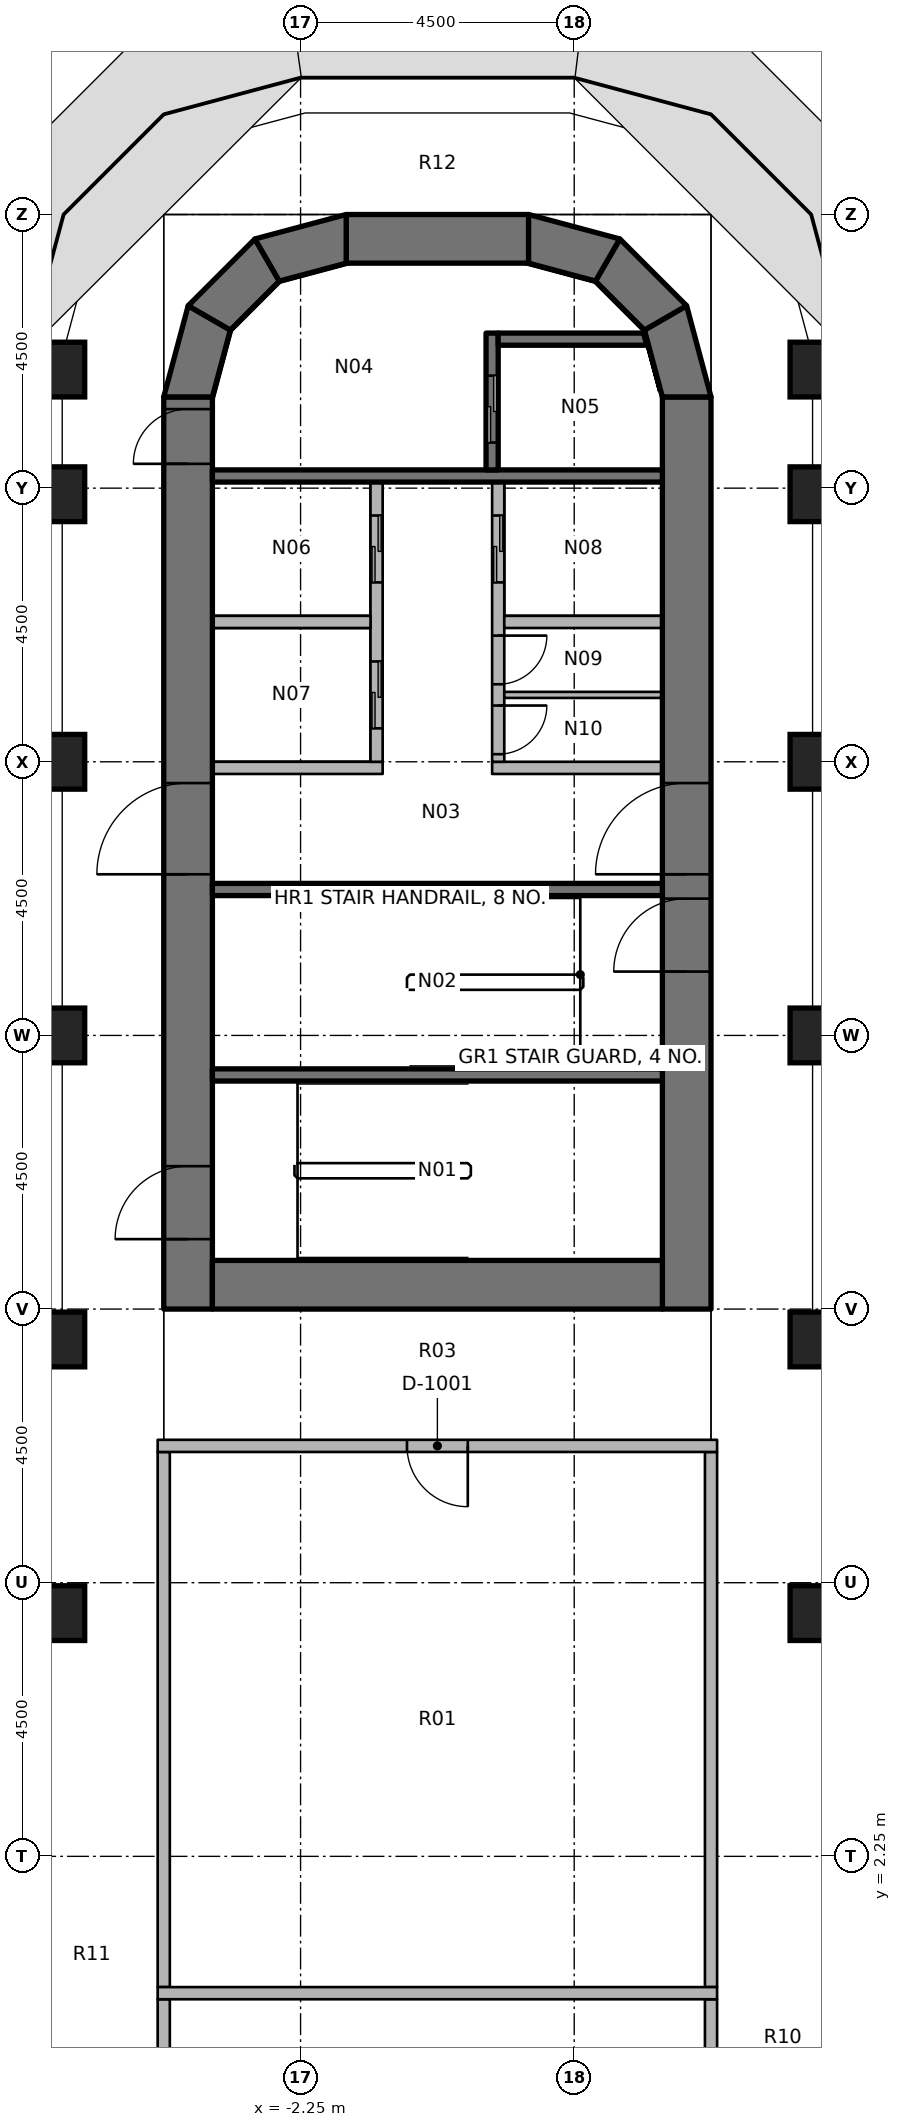
"""IFC4 building model, lengths in metres.
Left out: names, types, materials, properties, quantities, classifications, styles, units other than length and angle.
Written with IfcOpenShell. Run it as: python <this file> out.ifc"""

import sys

from ifc_helpers import new_model, si_unit, direction, frame, frame_2d, origin, origin_2d, place, context, subcontext, project, spatial, polyline, rectangle, outline, extrude, element, fill, save


model = new_model("IFC4")
c1 = context("Model", 3, precision=1e-05, world=origin(), true_north=direction((0.0, 1.0)))
c2 = subcontext(c1, "Body", "Model", "MODEL_VIEW")
j1 = project(units=[si_unit("LENGTHUNIT", "METRE"), si_unit("PLANEANGLEUNIT", "RADIAN")], contexts=[c1])
p1 = place(None, origin())
s1 = spatial("IfcSite", under=j1, at=p1, CompositionType="ELEMENT")
p2 = place(p1, origin())
s2 = spatial("IfcBuilding", under=s1, at=p2, CompositionType="ELEMENT")
p3 = place(p2, frame((0.0, 0.0, 117.0)))
s3 = spatial("IfcBuildingStorey", under=s2, at=p3, CompositionType="ELEMENT", Elevation=117.0)
for number, where, z_axis, x_axis in (
    (1, (-6.25, 6.25, 0.0), (0.0, 0.0, 1.0), (1.0, 0.0, 0.0)),
    (2, (-6.25, 10.75, 0.0), (0.0, 0.0, 1.0), (1.0, 0.0, 0.0)),
    (3, (-6.25, 15.75, 0.0), (0.0, 0.0, 1.0), (1.0, 0.0, 0.0)),
    (4, (-6.25, 20.25, 0.0), (0.0, 0.0, 1.0), (1.0, 0.0, 0.0)),
    (5, (-6.25, 24.65, 0.0), (0.0, 0.0, 1.0), (1.0, 0.0, 0.0)),
    (6, (-6.25, 26.7, 0.0), (0.0, 0.0, 1.0), (1.0, 0.0, 0.0)),
    (7, (6.25, 6.25, 0.0), (0.0, 0.0, 1.0), (1.0, 0.0, 0.0)),
    (8, (6.25, 10.75, 0.0), (0.0, 0.0, 1.0), (1.0, 0.0, 0.0)),
    (9, (6.25, 15.75, 0.0), (0.0, 0.0, 1.0), (1.0, 0.0, 0.0)),
    (10, (6.25, 20.25, 0.0), (0.0, 0.0, 1.0), (1.0, 0.0, 0.0)),
    (11, (6.25, 24.65, 0.0), (0.0, 0.0, 1.0), (1.0, 0.0, 0.0)),
    (12, (6.25, 26.7, 0.0), (0.0, 0.0, 1.0), (1.0, 0.0, 0.0)),
):
    element("IfcColumn", number, at=place(p3, frame(where, z_axis=z_axis, x_axis=x_axis)), inside=s3, PredefinedType="COLUMN", context=c2, shape_type="SweptSolid", body=[
        extrude(rectangle(XDim=0.9, YDim=0.9, at=origin_2d()), origin(), (0.0, 0.0, 1.0), 3.65),
    ])
p4 = place(p3, frame((-4.1, 11.25, 0.0), z_axis=(0.0, 0.0, 1.0), x_axis=(0.0, 1.0, 0.0)))
e13 = element("IfcWall", 13, at=p4, inside=s3, PredefinedType="SHEAR", context=c2, shape_type="SweptSolid", body=[
    extrude(rectangle(XDim=15.0, YDim=0.8, at=frame_2d((7.5, 0.0))), origin(), (0.0, 0.0, 1.0), 3.8),
])
p5 = place(p4, frame((7.15, 0.0, 0.0)))
e14 = element("IfcOpeningElement", 14, at=p5, cuts=e13, PredefinedType="OPENING", context=c2, shape_type="SweptSolid", body=[
    extrude(rectangle(XDim=1.5, YDim=2.3, at=frame_2d((0.75, 1.15))), frame((0.0, 0.41, 0.0), z_axis=(0.0, -1.0, 0.0), x_axis=(1.0, 0.0, 0.0)), (0.0, 0.0, 1.0), 0.82),
])
p6 = place(p4, frame((13.9, 0.0, 0.0)))
e15 = element("IfcOpeningElement", 15, at=p6, cuts=e13, PredefinedType="OPENING", context=c2, shape_type="SweptSolid", body=[
    extrude(rectangle(XDim=0.9, YDim=2.1, at=frame_2d((0.45, 1.05))), frame((0.0, 0.41, 0.0), z_axis=(0.0, -1.0, 0.0), x_axis=(1.0, 0.0, 0.0)), (0.0, 0.0, 1.0), 0.82),
])
p7 = place(p4, frame((1.15, 0.0, 0.0)))
e16 = element("IfcOpeningElement", 16, at=p7, cuts=e13, PredefinedType="OPENING", context=c2, shape_type="SweptSolid", body=[
    extrude(rectangle(XDim=1.2, YDim=2.1, at=frame_2d((0.6, 1.05))), frame((0.0, 0.41, 0.0), z_axis=(0.0, -1.0, 0.0), x_axis=(1.0, 0.0, 0.0)), (0.0, 0.0, 1.0), 0.82),
])
p8 = place(p3, frame((4.1, 11.25, 0.0), z_axis=(0.0, 0.0, 1.0), x_axis=(0.0, 1.0, 0.0)))
e17 = element("IfcWall", 17, at=p8, inside=s3, PredefinedType="SHEAR", context=c2, shape_type="SweptSolid", body=[
    extrude(rectangle(XDim=15.0, YDim=0.8, at=frame_2d((7.5, 0.0))), origin(), (0.0, 0.0, 1.0), 3.8),
])
p9 = place(p8, frame((7.15, 0.0, 0.0)))
e18 = element("IfcOpeningElement", 18, at=p9, cuts=e17, PredefinedType="OPENING", context=c2, shape_type="SweptSolid", body=[
    extrude(rectangle(XDim=1.5, YDim=2.3, at=frame_2d((0.75, 1.15))), frame((0.0, 0.41, 0.0), z_axis=(0.0, -1.0, 0.0), x_axis=(1.0, 0.0, 0.0)), (0.0, 0.0, 1.0), 0.82),
])
p10 = place(p8, frame((5.55, 0.0, 0.0)))
e19 = element("IfcOpeningElement", 19, at=p10, cuts=e17, PredefinedType="OPENING", context=c2, shape_type="SweptSolid", body=[
    extrude(rectangle(XDim=1.2, YDim=2.1, at=frame_2d((0.6, 1.05))), frame((0.0, 0.41, 0.0), z_axis=(0.0, -1.0, 0.0), x_axis=(1.0, 0.0, 0.0)), (0.0, 0.0, 1.0), 0.82),
])
p11 = place(p3, frame((-3.7, 11.65, 0.0), z_axis=(0.0, 0.0, 1.0), x_axis=(1.0, 0.0, 0.0)))
e20 = element("IfcWall", 20, at=p11, inside=s3, PredefinedType="SHEAR", context=c2, shape_type="SweptSolid", body=[
    extrude(rectangle(XDim=7.4, YDim=0.8, at=frame_2d((3.7, 0.0))), origin(), (0.0, 0.0, 1.0), 3.8),
])
p12 = place(p3, frame((-1.5, 28.85, 0.0), z_axis=(0.0, 0.0, 1.0), x_axis=(1.0, 0.0, 0.0)))
e21 = element("IfcWall", 21, at=p12, inside=s3, PredefinedType="SHEAR", context=c2, shape_type="SweptSolid", body=[
    extrude(rectangle(XDim=3.0, YDim=0.8, at=frame_2d((1.5, 0.0))), origin(), (0.0, 0.0, 1.0), 3.8),
])
p13 = place(p3, origin())
e22 = element("IfcWall", 22, at=p13, inside=s3, PredefinedType="SHEAR", context=c2, shape_type="SweptSolid", body=[
    extrude(outline(polyline([(-4.5, 26.25), (-4.098, 27.75), (-3.405, 27.35), (-3.7, 26.25), (-4.5, 26.25)])), origin(), (0.0, 0.0, 1.0), 3.8),
])
p14 = place(p3, origin())
e23 = element("IfcWall", 23, at=p14, inside=s3, PredefinedType="SHEAR", context=c2, shape_type="SweptSolid", body=[
    extrude(outline(polyline([(-4.098, 27.75), (-3.0, 28.848), (-2.6, 28.155), (-3.405, 27.35), (-4.098, 27.75)])), origin(), (0.0, 0.0, 1.0), 3.8),
])
p15 = place(p3, origin())
e24 = element("IfcWall", 24, at=p15, inside=s3, PredefinedType="SHEAR", context=c2, shape_type="SweptSolid", body=[
    extrude(outline(polyline([(-3.0, 28.848), (-1.5, 29.25), (-1.5, 28.45), (-2.6, 28.155), (-3.0, 28.848)])), origin(), (0.0, 0.0, 1.0), 3.8),
])
p16 = place(p3, origin())
e25 = element("IfcWall", 25, at=p16, inside=s3, PredefinedType="SHEAR", context=c2, shape_type="SweptSolid", body=[
    extrude(outline(polyline([(4.5, 26.25), (4.098, 27.75), (3.405, 27.35), (3.7, 26.25), (4.5, 26.25)])), origin(), (0.0, 0.0, 1.0), 3.8),
])
p17 = place(p3, origin())
e26 = element("IfcWall", 26, at=p17, inside=s3, PredefinedType="SHEAR", context=c2, shape_type="SweptSolid", body=[
    extrude(outline(polyline([(4.098, 27.75), (3.0, 28.848), (2.6, 28.155), (3.405, 27.35), (4.098, 27.75)])), origin(), (0.0, 0.0, 1.0), 3.8),
])
p18 = place(p3, origin())
e27 = element("IfcWall", 27, at=p18, inside=s3, PredefinedType="SHEAR", context=c2, shape_type="SweptSolid", body=[
    extrude(outline(polyline([(3.0, 28.848), (1.5, 29.25), (1.5, 28.45), (2.6, 28.155), (3.0, 28.848)])), origin(), (0.0, 0.0, 1.0), 3.8),
])
p19 = place(p3, frame((-3.7, 24.95, 0.0), z_axis=(0.0, 0.0, 1.0), x_axis=(1.0, 0.0, 0.0)))
e28 = element("IfcWall", 28, at=p19, inside=s3, PredefinedType="SHEAR", context=c2, shape_type="SweptSolid", body=[
    extrude(rectangle(XDim=7.4, YDim=0.2, at=frame_2d((3.7, 0.0))), origin(), (0.0, 0.0, 1.0), 3.65),
])
p20 = place(p3, frame((0.9, 27.3, 0.0), z_axis=(0.0, 0.0, 1.0), x_axis=(0.0, -1.0, 0.0)))
e29 = element("IfcWall", 29, at=p20, inside=s3, PredefinedType="SHEAR", context=c2, shape_type="SweptSolid", body=[
    extrude(rectangle(XDim=2.25, YDim=0.2, at=frame_2d((1.125, 0.0))), origin(), (0.0, 0.0, 1.0), 3.65),
])
p21 = place(p20, frame((0.7, 0.0, 0.0)))
e30 = element("IfcOpeningElement", 30, at=p21, cuts=e29, PredefinedType="OPENING", context=c2, shape_type="SweptSolid", body=[
    extrude(rectangle(XDim=1.1, YDim=2.3, at=frame_2d((0.55, 1.15))), frame((0.0, 0.11, 0.0), z_axis=(0.0, -1.0, 0.0), x_axis=(1.0, 0.0, 0.0)), (0.0, 0.0, 1.0), 0.22),
])
p22 = place(p3, origin())
e31 = element("IfcWall", 31, at=p22, inside=s3, PredefinedType="SHEAR", context=c2, shape_type="SweptSolid", body=[
    extrude(outline(polyline([(1.0, 27.1), (3.444, 27.1), (3.39, 27.3), (1.0, 27.3), (1.0, 27.1)])), origin(), (0.0, 0.0, 1.0), 3.65),
])
for number, where, z_axis, x_axis in (
    (32, (-3.7, 18.15, 0.0), (0.0, 0.0, 1.0), (1.0, 0.0, 0.0)),
    (33, (-3.7, 15.1, 0.0), (0.0, 0.0, 1.0), (1.0, 0.0, 0.0)),
):
    element("IfcWall", number, at=place(p3, frame(where, z_axis=z_axis, x_axis=x_axis)), inside=s3, PredefinedType="SHEAR", context=c2, shape_type="SweptSolid", body=[
        extrude(rectangle(XDim=7.4, YDim=0.2, at=frame_2d((3.7, 0.0))), origin(), (0.0, 0.0, 1.0), 3.65),
    ])
p23 = place(p3, frame((-3.7, 20.15, 0.0), z_axis=(0.0, 0.0, 1.0), x_axis=(1.0, 0.0, 0.0)))
e34 = element("IfcWall", 34, at=p23, inside=s3, PredefinedType="PARTITIONING", context=c2, shape_type="SweptSolid", body=[
    extrude(rectangle(XDim=2.8, YDim=0.2, at=frame_2d((1.4, 0.0))), origin(), (0.0, 0.0, 1.0), 3.65),
])
p24 = place(p3, frame((-1.0, 24.85, 0.0), z_axis=(0.0, 0.0, 1.0), x_axis=(0.0, -1.0, 0.0)))
e35 = element("IfcWall", 35, at=p24, inside=s3, PredefinedType="PARTITIONING", context=c2, shape_type="SweptSolid", body=[
    extrude(rectangle(XDim=4.6, YDim=0.2, at=frame_2d((2.3, 0.0))), origin(), (0.0, 0.0, 1.0), 3.65),
])
p25 = place(p24, frame((0.55, 0.0, 0.0)))
e36 = element("IfcOpeningElement", 36, at=p25, cuts=e35, PredefinedType="OPENING", context=c2, shape_type="SweptSolid", body=[
    extrude(rectangle(XDim=1.1, YDim=2.3, at=frame_2d((0.55, 1.15))), frame((0.0, 0.11, 0.0), z_axis=(0.0, -1.0, 0.0), x_axis=(1.0, 0.0, 0.0)), (0.0, 0.0, 1.0), 0.22),
])
p26 = place(p24, frame((2.95, 0.0, 0.0)))
e37 = element("IfcOpeningElement", 37, at=p26, cuts=e35, PredefinedType="OPENING", context=c2, shape_type="SweptSolid", body=[
    extrude(rectangle(XDim=1.1, YDim=2.3, at=frame_2d((0.55, 1.15))), frame((0.0, 0.11, 0.0), z_axis=(0.0, -1.0, 0.0), x_axis=(1.0, 0.0, 0.0)), (0.0, 0.0, 1.0), 0.22),
])
p27 = place(p3, frame((0.9, 20.15, 0.0), z_axis=(0.0, 0.0, 1.0), x_axis=(1.0, 0.0, 0.0)))
e38 = element("IfcWall", 38, at=p27, inside=s3, PredefinedType="PARTITIONING", context=c2, shape_type="SweptSolid", body=[
    extrude(rectangle(XDim=2.8, YDim=0.2, at=frame_2d((1.4, 0.0))), origin(), (0.0, 0.0, 1.0), 3.65),
])
p28 = place(p3, frame((1.0, 24.85, 0.0), z_axis=(0.0, 0.0, 1.0), x_axis=(0.0, -1.0, 0.0)))
e39 = element("IfcWall", 39, at=p28, inside=s3, PredefinedType="PARTITIONING", context=c2, shape_type="SweptSolid", body=[
    extrude(rectangle(XDim=4.6, YDim=0.2, at=frame_2d((2.3, 0.0))), origin(), (0.0, 0.0, 1.0), 3.65),
])
p29 = place(p28, frame((0.55, 0.0, 0.0)))
e40 = element("IfcOpeningElement", 40, at=p29, cuts=e39, PredefinedType="OPENING", context=c2, shape_type="SweptSolid", body=[
    extrude(rectangle(XDim=1.1, YDim=2.3, at=frame_2d((0.55, 1.15))), frame((0.0, 0.11, 0.0), z_axis=(0.0, -1.0, 0.0), x_axis=(1.0, 0.0, 0.0)), (0.0, 0.0, 1.0), 0.22),
])
p30 = place(p28, frame((2.525, 0.0, 0.0)))
e41 = element("IfcOpeningElement", 41, at=p30, cuts=e39, PredefinedType="OPENING", context=c2, shape_type="SweptSolid", body=[
    extrude(rectangle(XDim=0.8, YDim=2.1, at=frame_2d((0.4, 1.05))), frame((0.0, 0.11, 0.0), z_axis=(0.0, -1.0, 0.0), x_axis=(1.0, 0.0, 0.0)), (0.0, 0.0, 1.0), 0.22),
])
p31 = place(p28, frame((3.675, 0.0, 0.0)))
e42 = element("IfcOpeningElement", 42, at=p31, cuts=e39, PredefinedType="OPENING", context=c2, shape_type="SweptSolid", body=[
    extrude(rectangle(XDim=0.8, YDim=2.1, at=frame_2d((0.4, 1.05))), frame((0.0, 0.11, 0.0), z_axis=(0.0, -1.0, 0.0), x_axis=(1.0, 0.0, 0.0)), (0.0, 0.0, 1.0), 0.22),
])
for number, where, z_axis, x_axis in (
    (43, (-3.7, 22.55, 0.0), (0.0, 0.0, 1.0), (1.0, 0.0, 0.0)),
    (44, (1.1, 22.55, 0.0), (0.0, 0.0, 1.0), (1.0, 0.0, 0.0)),
):
    element("IfcWall", number, at=place(p3, frame(where, z_axis=z_axis, x_axis=x_axis)), inside=s3, PredefinedType="PARTITIONING", context=c2, shape_type="SweptSolid", body=[
        extrude(rectangle(XDim=2.6, YDim=0.2, at=frame_2d((1.3, 0.0))), origin(), (0.0, 0.0, 1.0), 3.65),
    ])
p32 = place(p3, frame((1.1, 21.35, 0.0), z_axis=(0.0, 0.0, 1.0), x_axis=(1.0, 0.0, 0.0)))
e45 = element("IfcWall", 45, at=p32, inside=s3, PredefinedType="PARTITIONING", context=c2, shape_type="SweptSolid", body=[
    extrude(rectangle(XDim=2.6, YDim=0.1, at=frame_2d((1.3, 0.0))), origin(), (0.0, 0.0, 1.0), 3.65),
])
for number, where, z_axis, x_axis in (
    (46, (-4.5, 0.1, 0.0), (0.0, 0.0, 1.0), (0.0, 1.0, 0.0)),
    (47, (-4.5, -8.9, 0.0), (0.0, 0.0, 1.0), (0.0, 1.0, 0.0)),
    (48, (4.5, 0.1, 0.0), (0.0, 0.0, 1.0), (0.0, 1.0, 0.0)),
    (49, (4.5, -8.9, 0.0), (0.0, 0.0, 1.0), (0.0, 1.0, 0.0)),
):
    element("IfcWall", number, at=place(p3, frame(where, z_axis=z_axis, x_axis=x_axis)), inside=s3, PredefinedType="PARTITIONING", context=c2, shape_type="SweptSolid", body=[
        extrude(rectangle(XDim=8.8, YDim=0.2, at=frame_2d((4.4, 0.0))), origin(), (0.0, 0.0, 1.0), 2.738),
    ])
p33 = place(p3, frame((4.6, 9.0, 0.0), z_axis=(0.0, 0.0, 1.0), x_axis=(-1.0, 0.0, 0.0)))
e50 = element("IfcWall", 50, at=p33, inside=s3, PredefinedType="PARTITIONING", context=c2, shape_type="SweptSolid", body=[
    extrude(rectangle(XDim=9.2, YDim=0.2, at=frame_2d((4.6, 0.0))), origin(), (0.0, 0.0, 1.0), 2.738),
])
p34 = place(p33, frame((4.1, 0.0, 0.0)))
e51 = element("IfcOpeningElement", 51, at=p34, cuts=e50, PredefinedType="OPENING", context=c2, shape_type="SweptSolid", body=[
    extrude(rectangle(XDim=1.0, YDim=2.1, at=frame_2d((0.5, 1.05))), frame((0.0, 0.11, 0.0), z_axis=(0.0, -1.0, 0.0), x_axis=(1.0, 0.0, 0.0)), (0.0, 0.0, 1.0), 0.22),
])
p35 = place(p3, frame((-4.6, 0.0, 0.0), z_axis=(0.0, 0.0, 1.0), x_axis=(1.0, 0.0, 0.0)))
e52 = element("IfcWall", 52, at=p35, inside=s3, PredefinedType="PARTITIONING", context=c2, shape_type="SweptSolid", body=[
    extrude(rectangle(XDim=9.2, YDim=0.2, at=frame_2d((4.6, 0.0))), origin(), (0.0, 0.0, 1.0), 2.738),
])
p36 = place(p5, origin())
e53 = element("IfcDoor", 53, at=p36, inside=s3, OperationType="DOUBLE_DOOR_SINGLE_SWING", PredefinedType="DOOR", context=c2, shape_type="SweptSolid", body=[
    extrude(rectangle(XDim=1.5, YDim=2.3, at=frame_2d((0.75, 1.15))), frame((0.0, 0.025, 0.0), z_axis=(0.0, -1.0, 0.0), x_axis=(1.0, 0.0, 0.0)), (0.0, 0.0, 1.0), 0.05),
])
fill(e14, e53)
p37 = place(p9, origin())
e54 = element("IfcDoor", 54, at=p37, inside=s3, OperationType="DOUBLE_DOOR_SINGLE_SWING", PredefinedType="DOOR", context=c2, shape_type="SweptSolid", body=[
    extrude(rectangle(XDim=1.5, YDim=2.3, at=frame_2d((0.75, 1.15))), frame((0.0, 0.025, 0.0), z_axis=(0.0, -1.0, 0.0), x_axis=(1.0, 0.0, 0.0)), (0.0, 0.0, 1.0), 0.05),
])
fill(e18, e54)
p38 = place(p6, origin())
e55 = element("IfcDoor", 55, at=p38, inside=s3, OperationType="SINGLE_SWING_RIGHT", PredefinedType="DOOR", context=c2, shape_type="SweptSolid", body=[
    extrude(rectangle(XDim=0.9, YDim=2.1, at=frame_2d((0.45, 1.05))), frame((0.0, 0.025, 0.0), z_axis=(0.0, -1.0, 0.0), x_axis=(1.0, 0.0, 0.0)), (0.0, 0.0, 1.0), 0.05),
])
fill(e15, e55)
p39 = place(p10, origin())
e56 = element("IfcDoor", 56, at=p39, inside=s3, OperationType="SINGLE_SWING_RIGHT", PredefinedType="DOOR", context=c2, shape_type="SweptSolid", body=[
    extrude(rectangle(XDim=1.2, YDim=2.1, at=frame_2d((0.6, 1.05))), frame((0.0, 0.025, 0.0), z_axis=(0.0, -1.0, 0.0), x_axis=(1.0, 0.0, 0.0)), (0.0, 0.0, 1.0), 0.05),
])
fill(e19, e56)
p40 = place(p7, origin())
e57 = element("IfcDoor", 57, at=p40, inside=s3, OperationType="SINGLE_SWING_RIGHT", PredefinedType="DOOR", context=c2, shape_type="SweptSolid", body=[
    extrude(rectangle(XDim=1.2, YDim=2.1, at=frame_2d((0.6, 1.05))), frame((0.0, 0.025, 0.0), z_axis=(0.0, -1.0, 0.0), x_axis=(1.0, 0.0, 0.0)), (0.0, 0.0, 1.0), 0.05),
])
fill(e16, e57)
p41 = place(p21, origin())
e58 = element("IfcDoor", 58, at=p41, inside=s3, OperationType="DOUBLE_DOOR_SLIDING", PredefinedType="DOOR", context=c2, shape_type="SweptSolid", body=[
    extrude(rectangle(XDim=1.1, YDim=2.3, at=frame_2d((0.55, 1.15))), frame((0.0, 0.025, 0.0), z_axis=(0.0, -1.0, 0.0), x_axis=(1.0, 0.0, 0.0)), (0.0, 0.0, 1.0), 0.05),
])
fill(e30, e58)
p42 = place(p25, origin())
e59 = element("IfcDoor", 59, at=p42, inside=s3, OperationType="DOUBLE_DOOR_SLIDING", PredefinedType="DOOR", context=c2, shape_type="SweptSolid", body=[
    extrude(rectangle(XDim=1.1, YDim=2.3, at=frame_2d((0.55, 1.15))), frame((0.0, 0.025, 0.0), z_axis=(0.0, -1.0, 0.0), x_axis=(1.0, 0.0, 0.0)), (0.0, 0.0, 1.0), 0.05),
])
fill(e36, e59)
p43 = place(p26, origin())
e60 = element("IfcDoor", 60, at=p43, inside=s3, OperationType="DOUBLE_DOOR_SLIDING", PredefinedType="DOOR", context=c2, shape_type="SweptSolid", body=[
    extrude(rectangle(XDim=1.1, YDim=2.3, at=frame_2d((0.55, 1.15))), frame((0.0, 0.025, 0.0), z_axis=(0.0, -1.0, 0.0), x_axis=(1.0, 0.0, 0.0)), (0.0, 0.0, 1.0), 0.05),
])
fill(e37, e60)
p44 = place(p29, origin())
e61 = element("IfcDoor", 61, at=p44, inside=s3, OperationType="DOUBLE_DOOR_SLIDING", PredefinedType="DOOR", context=c2, shape_type="SweptSolid", body=[
    extrude(rectangle(XDim=1.1, YDim=2.3, at=frame_2d((0.55, 1.15))), frame((0.0, 0.025, 0.0), z_axis=(0.0, -1.0, 0.0), x_axis=(1.0, 0.0, 0.0)), (0.0, 0.0, 1.0), 0.05),
])
fill(e40, e61)
p45 = place(p30, origin())
e62 = element("IfcDoor", 62, at=p45, inside=s3, OperationType="SINGLE_SWING_RIGHT", PredefinedType="DOOR", context=c2, shape_type="SweptSolid", body=[
    extrude(rectangle(XDim=0.8, YDim=2.1, at=frame_2d((0.4, 1.05))), frame((0.0, 0.025, 0.0), z_axis=(0.0, -1.0, 0.0), x_axis=(1.0, 0.0, 0.0)), (0.0, 0.0, 1.0), 0.05),
])
fill(e41, e62)
p46 = place(p31, origin())
e63 = element("IfcDoor", 63, at=p46, inside=s3, OperationType="SINGLE_SWING_RIGHT", PredefinedType="DOOR", context=c2, shape_type="SweptSolid", body=[
    extrude(rectangle(XDim=0.8, YDim=2.1, at=frame_2d((0.4, 1.05))), frame((0.0, 0.025, 0.0), z_axis=(0.0, -1.0, 0.0), x_axis=(1.0, 0.0, 0.0)), (0.0, 0.0, 1.0), 0.05),
])
fill(e42, e63)
p47 = place(p34, origin())
e64 = element("IfcDoor", 64, at=p47, inside=s3, OperationType="SINGLE_SWING_RIGHT", PredefinedType="DOOR", context=c2, shape_type="SweptSolid", body=[
    extrude(rectangle(XDim=1.0, YDim=2.1, at=frame_2d((0.5, 1.05))), frame((0.0, 0.025, 0.0), z_axis=(0.0, -1.0, 0.0), x_axis=(1.0, 0.0, 0.0)), (0.0, 0.0, 1.0), 0.05),
])
fill(e51, e64)
save(model, sys.argv[1])
